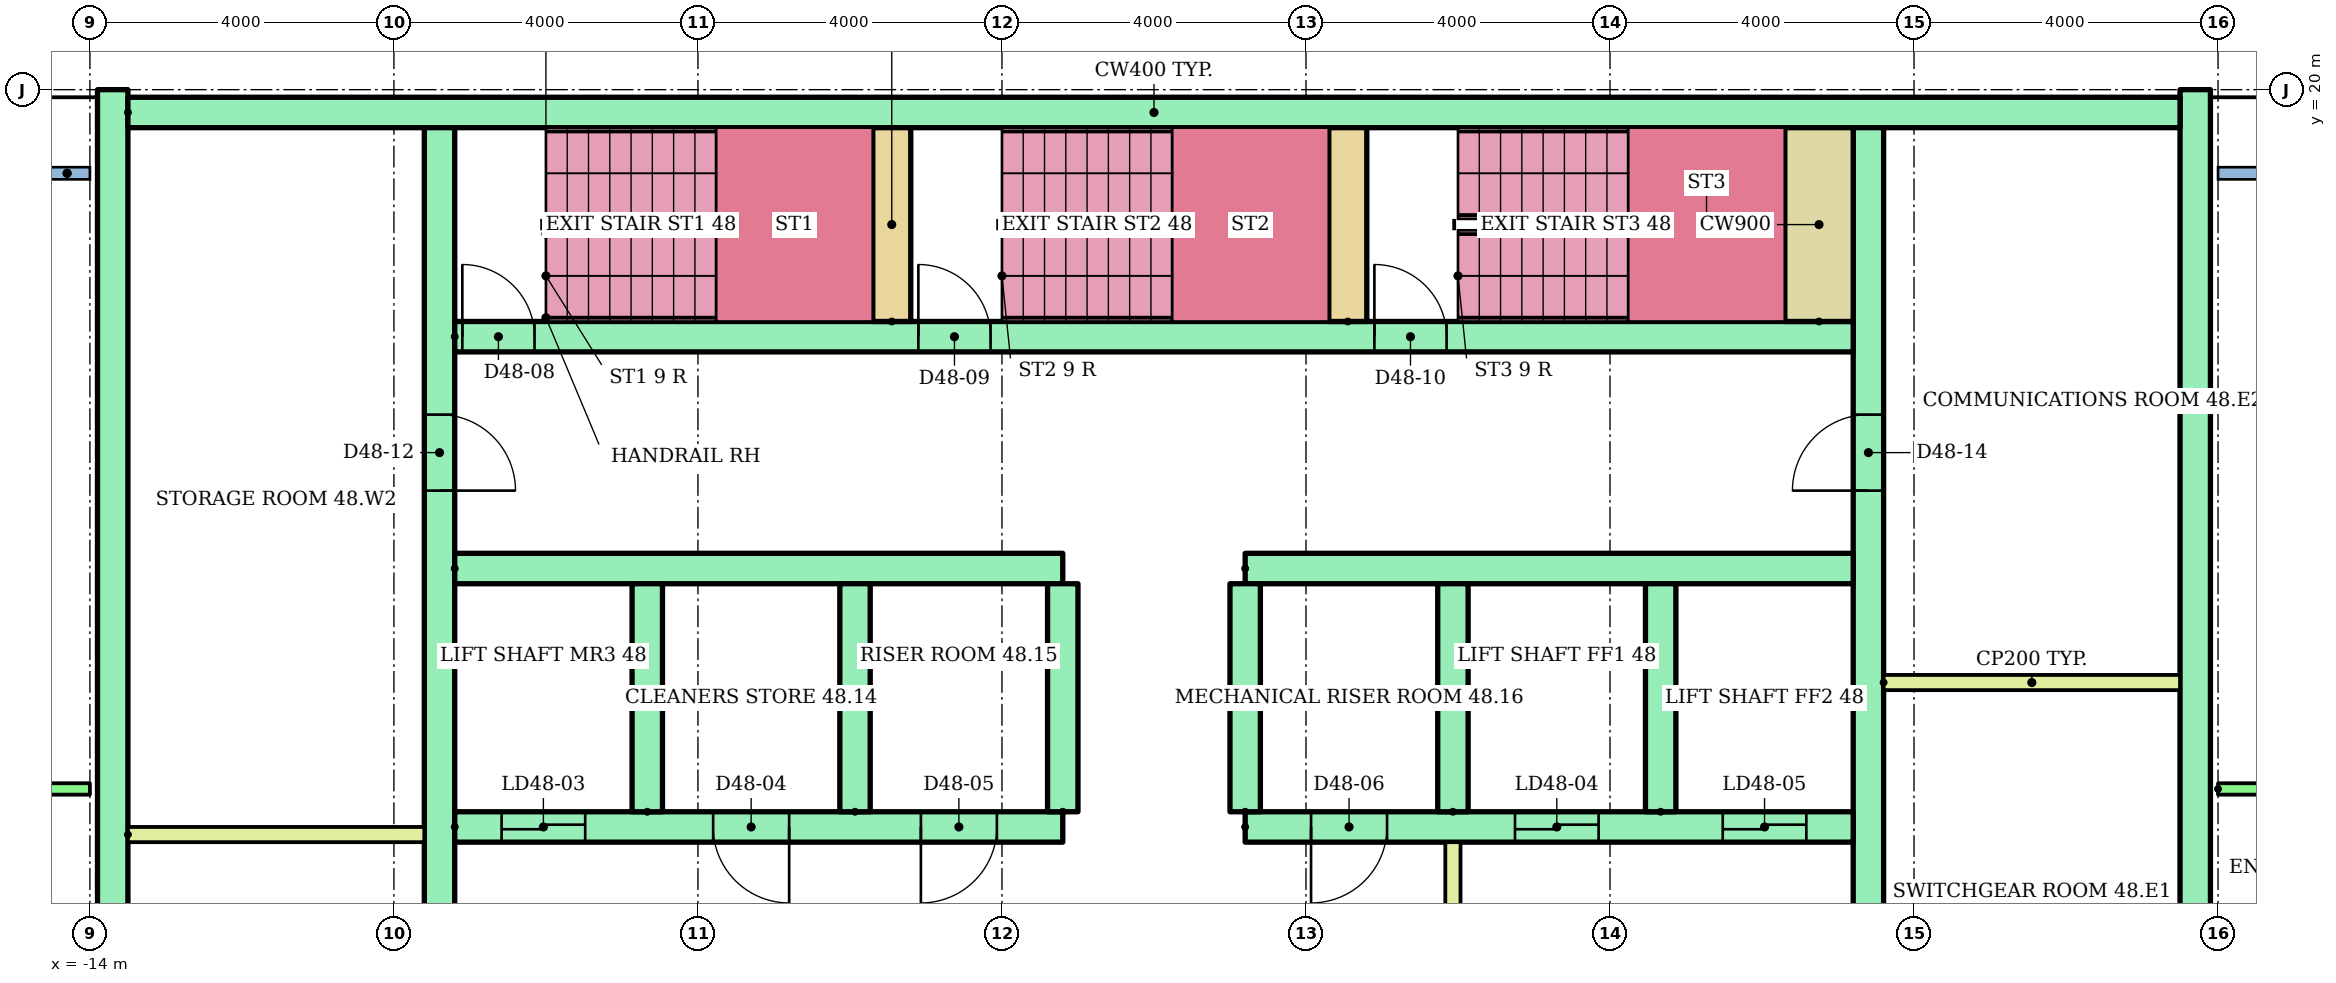
"""IFC4 building model, lengths in metres.
Left out: names, types, materials, properties, quantities, classifications, styles, units other than length and angle.
Written with IfcOpenShell. Run it as: python <this file> out.ifc"""

import sys

from ifc_helpers import new_model, si_unit, direction, frame, frame_2d, origin, place, context, subcontext, project, spatial, rectangle, extrude, element, fill, save


model = new_model("IFC4")
c1 = context("Model", 3, precision=1e-05, world=origin(), true_north=direction((0.0, 1.0)))
c2 = subcontext(c1, "Body", "Model", "MODEL_VIEW")
j1 = project(units=[si_unit("LENGTHUNIT", "METRE"), si_unit("PLANEANGLEUNIT", "RADIAN")], contexts=[c1])
p1 = place(None, origin())
s1 = spatial("IfcSite", under=j1, at=p1, CompositionType="ELEMENT")
p2 = place(p1, origin())
s2 = spatial("IfcBuilding", under=s1, at=p2, CompositionType="ELEMENT")
p3 = place(p2, frame((0.0, 0.0, 184.5)))
s3 = spatial("IfcBuildingStorey", under=s2, at=p3, CompositionType="ELEMENT", Elevation=184.5)
for number, where, z_axis, x_axis in (
    (1, (-13.7, 3.0, 0.0), (0.0, 0.0, 1.0), (0.0, 1.0, 0.0)),
    (2, (13.7, 3.0, 0.0), (0.0, 0.0, 1.0), (0.0, 1.0, 0.0)),
):
    element("IfcWall", number, at=place(p3, frame(where, z_axis=z_axis, x_axis=x_axis)), inside=s3, PredefinedType="SHEAR", context=c2, shape_type="SweptSolid", body=[
        extrude(rectangle(XDim=17.0, YDim=0.4, at=frame_2d((8.5, 0.0))), origin(), (0.0, 0.0, 1.0), 2.92),
    ])
p4 = place(p3, frame((-13.5, 19.7, 0.0)))
e3 = element("IfcWall", 3, at=p4, inside=s3, PredefinedType="SHEAR", context=c2, shape_type="SweptSolid", body=[
    extrude(rectangle(XDim=27.0, YDim=0.4, at=frame_2d((13.5, 0.0))), origin(), (0.0, 0.0, 1.0), 2.92),
])
p5 = place(p3, frame((-9.4, 6.8, 0.0), z_axis=(0.0, 0.0, 1.0), x_axis=(0.0, 1.0, 0.0)))
e4 = element("IfcWall", 4, at=p5, inside=s3, PredefinedType="SHEAR", context=c2, shape_type="SweptSolid", body=[
    extrude(rectangle(XDim=12.7, YDim=0.4, at=frame_2d((6.35, 0.0))), origin(), (0.0, 0.0, 1.0), 2.92),
])
p6 = place(p5, frame((1.15, 0.0, 0.0)))
e5 = element("IfcOpeningElement", 5, at=p6, cuts=e4, PredefinedType="OPENING", context=c2, shape_type="SweptSolid", body=[
    extrude(rectangle(XDim=1.0, YDim=2.1, at=frame_2d((0.5, 1.05))), frame((0.0, 0.21, 0.0), z_axis=(0.0, -1.0, 0.0), x_axis=(1.0, 0.0, 0.0)), (0.0, 0.0, 1.0), 0.42),
])
p7 = place(p5, frame((7.925, 0.0, 0.0)))
e6 = element("IfcOpeningElement", 6, at=p7, cuts=e4, PredefinedType="OPENING", context=c2, shape_type="SweptSolid", body=[
    extrude(rectangle(XDim=1.0, YDim=2.1, at=frame_2d((0.5, 1.05))), frame((0.0, 0.21, 0.0), z_axis=(0.0, -1.0, 0.0), x_axis=(1.0, 0.0, 0.0)), (0.0, 0.0, 1.0), 0.42),
])
p8 = place(p3, frame((9.4, 6.8, 0.0), z_axis=(0.0, 0.0, 1.0), x_axis=(0.0, 1.0, 0.0)))
e7 = element("IfcWall", 7, at=p8, inside=s3, PredefinedType="SHEAR", context=c2, shape_type="SweptSolid", body=[
    extrude(rectangle(XDim=12.7, YDim=0.4, at=frame_2d((6.35, 0.0))), origin(), (0.0, 0.0, 1.0), 2.92),
])
p9 = place(p8, frame((1.15, 0.0, 0.0)))
e8 = element("IfcOpeningElement", 8, at=p9, cuts=e7, PredefinedType="OPENING", context=c2, shape_type="SweptSolid", body=[
    extrude(rectangle(XDim=1.0, YDim=2.1, at=frame_2d((0.5, 1.05))), frame((0.0, 0.21, 0.0), z_axis=(0.0, -1.0, 0.0), x_axis=(1.0, 0.0, 0.0)), (0.0, 0.0, 1.0), 0.42),
])
p10 = place(p8, frame((7.925, 0.0, 0.0)))
e9 = element("IfcOpeningElement", 9, at=p10, cuts=e7, PredefinedType="OPENING", context=c2, shape_type="SweptSolid", body=[
    extrude(rectangle(XDim=1.0, YDim=2.1, at=frame_2d((0.5, 1.05))), frame((0.0, 0.21, 0.0), z_axis=(0.0, -1.0, 0.0), x_axis=(1.0, 0.0, 0.0)), (0.0, 0.0, 1.0), 0.42),
])
p11 = place(p3, frame((-9.2, 10.3, 0.0)))
e10 = element("IfcWall", 10, at=p11, inside=s3, PredefinedType="SHEAR", context=c2, shape_type="SweptSolid", body=[
    extrude(rectangle(XDim=8.0, YDim=0.4, at=frame_2d((4.0, 0.0))), origin(), (0.0, 0.0, 1.0), 2.92),
])
p12 = place(p11, frame((0.617, 0.0, 0.0)))
e11 = element("IfcOpeningElement", 11, at=p12, cuts=e10, PredefinedType="OPENING", context=c2, shape_type="SweptSolid", body=[
    extrude(rectangle(XDim=1.1, YDim=2.1, at=frame_2d((0.55, 1.05))), frame((0.0, 0.21, 0.0), z_axis=(0.0, -1.0, 0.0), x_axis=(1.0, 0.0, 0.0)), (0.0, 0.0, 1.0), 0.42),
])
p13 = place(p11, frame((3.4, 0.0, 0.0)))
e12 = element("IfcOpeningElement", 12, at=p13, cuts=e10, PredefinedType="OPENING", context=c2, shape_type="SweptSolid", body=[
    extrude(rectangle(XDim=1.0, YDim=2.1, at=frame_2d((0.5, 1.05))), frame((0.0, 0.21, 0.0), z_axis=(0.0, -1.0, 0.0), x_axis=(1.0, 0.0, 0.0)), (0.0, 0.0, 1.0), 0.42),
])
p14 = place(p11, frame((6.133, 0.0, 0.0)))
e13 = element("IfcOpeningElement", 13, at=p14, cuts=e10, PredefinedType="OPENING", context=c2, shape_type="SweptSolid", body=[
    extrude(rectangle(XDim=1.0, YDim=2.1, at=frame_2d((0.5, 1.05))), frame((0.0, 0.21, 0.0), z_axis=(0.0, -1.0, 0.0), x_axis=(1.0, 0.0, 0.0)), (0.0, 0.0, 1.0), 0.42),
])
p15 = place(p3, frame((-9.2, 13.7, 0.0)))
e14 = element("IfcWall", 14, at=p15, inside=s3, PredefinedType="SHEAR", context=c2, shape_type="SweptSolid", body=[
    extrude(rectangle(XDim=8.0, YDim=0.4, at=frame_2d((4.0, 0.0))), origin(), (0.0, 0.0, 1.0), 2.92),
])
p16 = place(p3, frame((1.2, 10.3, 0.0)))
e15 = element("IfcWall", 15, at=p16, inside=s3, PredefinedType="SHEAR", context=c2, shape_type="SweptSolid", body=[
    extrude(rectangle(XDim=8.0, YDim=0.4, at=frame_2d((4.0, 0.0))), origin(), (0.0, 0.0, 1.0), 2.92),
])
p17 = place(p16, frame((3.55, 0.0, 0.0)))
e16 = element("IfcOpeningElement", 16, at=p17, cuts=e15, PredefinedType="OPENING", context=c2, shape_type="SweptSolid", body=[
    extrude(rectangle(XDim=1.1, YDim=2.1, at=frame_2d((0.55, 1.05))), frame((0.0, 0.21, 0.0), z_axis=(0.0, -1.0, 0.0), x_axis=(1.0, 0.0, 0.0)), (0.0, 0.0, 1.0), 0.42),
])
p18 = place(p16, frame((6.283, 0.0, 0.0)))
e17 = element("IfcOpeningElement", 17, at=p18, cuts=e15, PredefinedType="OPENING", context=c2, shape_type="SweptSolid", body=[
    extrude(rectangle(XDim=1.1, YDim=2.1, at=frame_2d((0.55, 1.05))), frame((0.0, 0.21, 0.0), z_axis=(0.0, -1.0, 0.0), x_axis=(1.0, 0.0, 0.0)), (0.0, 0.0, 1.0), 0.42),
])
p19 = place(p16, frame((0.867, 0.0, 0.0)))
e18 = element("IfcOpeningElement", 18, at=p19, cuts=e15, PredefinedType="OPENING", context=c2, shape_type="SweptSolid", body=[
    extrude(rectangle(XDim=1.0, YDim=2.1, at=frame_2d((0.5, 1.05))), frame((0.0, 0.21, 0.0), z_axis=(0.0, -1.0, 0.0), x_axis=(1.0, 0.0, 0.0)), (0.0, 0.0, 1.0), 0.42),
])
p20 = place(p3, frame((1.2, 13.7, 0.0)))
e19 = element("IfcWall", 19, at=p20, inside=s3, PredefinedType="SHEAR", context=c2, shape_type="SweptSolid", body=[
    extrude(rectangle(XDim=8.0, YDim=0.4, at=frame_2d((4.0, 0.0))), origin(), (0.0, 0.0, 1.0), 2.92),
])
for number, where, z_axis, x_axis in (
    (20, (-6.667, 10.5, 0.0), (0.0, 0.0, 1.0), (0.0, 1.0, 0.0)),
    (21, (-3.933, 10.5, 0.0), (0.0, 0.0, 1.0), (0.0, 1.0, 0.0)),
    (22, (-1.2, 10.5, 0.0), (0.0, 0.0, 1.0), (0.0, 1.0, 0.0)),
    (23, (1.2, 10.5, 0.0), (0.0, 0.0, 1.0), (0.0, 1.0, 0.0)),
    (24, (3.933, 10.5, 0.0), (0.0, 0.0, 1.0), (0.0, 1.0, 0.0)),
    (25, (6.667, 10.5, 0.0), (0.0, 0.0, 1.0), (0.0, 1.0, 0.0)),
):
    element("IfcWall", number, at=place(p3, frame(where, z_axis=z_axis, x_axis=x_axis)), inside=s3, PredefinedType="SHEAR", context=c2, shape_type="SweptSolid", body=[
        extrude(rectangle(XDim=3.0, YDim=0.4, at=frame_2d((1.5, 0.0))), origin(), (0.0, 0.0, 1.0), 2.92),
    ])
p21 = place(p3, frame((3.933, 6.8, 0.0), z_axis=(0.0, 0.0, 1.0), x_axis=(0.0, 1.0, 0.0)))
e26 = element("IfcWall", 26, at=p21, inside=s3, PredefinedType="PARTITIONING", context=c2, shape_type="SweptSolid", body=[
    extrude(rectangle(XDim=3.3, YDim=0.2, at=frame_2d((1.65, 0.0))), origin(), (0.0, 0.0, 1.0), 2.92),
])
p22 = place(p21, frame((1.1, 0.0, 0.0)))
e27 = element("IfcOpeningElement", 27, at=p22, cuts=e26, PredefinedType="OPENING", context=c2, shape_type="SweptSolid", body=[
    extrude(rectangle(XDim=1.1, YDim=2.1, at=frame_2d((0.55, 1.05))), frame((0.0, 0.11, 0.0), z_axis=(0.0, -1.0, 0.0), x_axis=(1.0, 0.0, 0.0)), (0.0, 0.0, 1.0), 0.22),
])
p23 = place(p3, frame((-9.2, 16.75, 0.0)))
e28 = element("IfcWall", 28, at=p23, inside=s3, PredefinedType="SHEAR", context=c2, shape_type="SweptSolid", body=[
    extrude(rectangle(XDim=18.4, YDim=0.4, at=frame_2d((9.2, 0.0))), origin(), (0.0, 0.0, 1.0), 2.92),
])
p24 = place(p23, frame((0.1, 0.0, 0.0)))
e29 = element("IfcOpeningElement", 29, at=p24, cuts=e28, PredefinedType="OPENING", context=c2, shape_type="SweptSolid", body=[
    extrude(rectangle(XDim=0.95, YDim=2.1, at=frame_2d((0.475, 1.05))), frame((0.0, 0.21, 0.0), z_axis=(0.0, -1.0, 0.0), x_axis=(1.0, 0.0, 0.0)), (0.0, 0.0, 1.0), 0.42),
])
p25 = place(p23, frame((6.1, 0.0, 0.0)))
e30 = element("IfcOpeningElement", 30, at=p25, cuts=e28, PredefinedType="OPENING", context=c2, shape_type="SweptSolid", body=[
    extrude(rectangle(XDim=0.95, YDim=2.1, at=frame_2d((0.475, 1.05))), frame((0.0, 0.21, 0.0), z_axis=(0.0, -1.0, 0.0), x_axis=(1.0, 0.0, 0.0)), (0.0, 0.0, 1.0), 0.42),
])
p26 = place(p23, frame((12.1, 0.0, 0.0)))
e31 = element("IfcOpeningElement", 31, at=p26, cuts=e28, PredefinedType="OPENING", context=c2, shape_type="SweptSolid", body=[
    extrude(rectangle(XDim=0.95, YDim=2.1, at=frame_2d((0.475, 1.05))), frame((0.0, 0.21, 0.0), z_axis=(0.0, -1.0, 0.0), x_axis=(1.0, 0.0, 0.0)), (0.0, 0.0, 1.0), 0.42),
])
for number, where, z_axis, x_axis in (
    (32, (-3.45, 16.95, 0.0), (0.0, 0.0, 1.0), (0.0, 1.0, 0.0)),
    (33, (2.55, 16.95, 0.0), (0.0, 0.0, 1.0), (0.0, 1.0, 0.0)),
):
    element("IfcWall", number, at=place(p3, frame(where, z_axis=z_axis, x_axis=x_axis)), inside=s3, PredefinedType="SHEAR", context=c2, shape_type="SweptSolid", body=[
        extrude(rectangle(XDim=2.55, YDim=0.5, at=frame_2d((1.275, 0.0))), origin(), (0.0, 0.0, 1.0), 2.92),
    ])
p27 = place(p3, frame((8.75, 16.95, 0.0), z_axis=(0.0, 0.0, 1.0), x_axis=(0.0, 1.0, 0.0)))
e34 = element("IfcWall", 34, at=p27, inside=s3, PredefinedType="SHEAR", context=c2, shape_type="SweptSolid", body=[
    extrude(rectangle(XDim=2.55, YDim=0.9, at=frame_2d((1.275, 0.0))), origin(), (0.0, 0.0, 1.0), 2.92),
])
for number, where in (
    (35, (-13.5, 10.2, 0.0)),
    (36, (9.6, 12.2, 0.0)),
):
    element("IfcWall", number, at=place(p3, frame(where)), inside=s3, PredefinedType="PARTITIONING", context=c2, shape_type="SweptSolid", body=[
        extrude(rectangle(XDim=3.9, YDim=0.2, at=frame_2d((1.95, 0.0))), origin(), (0.0, 0.0, 1.0), 2.92),
    ])
p28 = place(p3, frame((-24.82, 10.8, 0.0)))
e37 = element("IfcWall", 37, at=p28, inside=s3, PredefinedType="PARTITIONING", context=c2, shape_type="SweptSolid", body=[
    extrude(rectangle(XDim=10.82, YDim=0.15, at=frame_2d((5.41, 0.0))), origin(), (0.0, 0.0, 1.0), 2.4),
])
p29 = place(p28, frame((1.273, 0.0, 0.0)))
e38 = element("IfcOpeningElement", 38, at=p29, cuts=e37, PredefinedType="OPENING", context=c2, shape_type="SweptSolid", body=[
    extrude(rectangle(XDim=1.0, YDim=2.1, at=frame_2d((0.5, 1.05))), frame((0.0, 0.085, 0.0), z_axis=(0.0, -1.0, 0.0), x_axis=(1.0, 0.0, 0.0)), (0.0, 0.0, 1.0), 0.17),
])
p30 = place(p28, frame((7.32, 0.0, 0.0)))
e39 = element("IfcOpeningElement", 39, at=p30, cuts=e37, PredefinedType="OPENING", context=c2, shape_type="SweptSolid", body=[
    extrude(rectangle(XDim=0.9, YDim=2.1, at=frame_2d((0.45, 1.05))), frame((0.0, 0.085, 0.0), z_axis=(0.0, -1.0, 0.0), x_axis=(1.0, 0.0, 0.0)), (0.0, 0.0, 1.0), 0.17),
])
p31 = place(p3, frame((14.0, 10.8, 0.0)))
e40 = element("IfcWall", 40, at=p31, inside=s3, PredefinedType="PARTITIONING", context=c2, shape_type="SweptSolid", body=[
    extrude(rectangle(XDim=12.0, YDim=0.15, at=frame_2d((6.0, 0.0))), origin(), (0.0, 0.0, 1.0), 2.4),
])
p32 = place(p31, frame((1.5, 0.0, 0.0)))
e41 = element("IfcOpeningElement", 41, at=p32, cuts=e40, PredefinedType="OPENING", context=c2, shape_type="SweptSolid", body=[
    extrude(rectangle(XDim=1.0, YDim=2.1, at=frame_2d((0.5, 1.05))), frame((0.0, 0.085, 0.0), z_axis=(0.0, -1.0, 0.0), x_axis=(1.0, 0.0, 0.0)), (0.0, 0.0, 1.0), 0.17),
])
p33 = place(p31, frame((7.55, 0.0, 0.0)))
e42 = element("IfcOpeningElement", 42, at=p33, cuts=e40, PredefinedType="OPENING", context=c2, shape_type="SweptSolid", body=[
    extrude(rectangle(XDim=0.9, YDim=2.1, at=frame_2d((0.45, 1.05))), frame((0.0, 0.085, 0.0), z_axis=(0.0, -1.0, 0.0), x_axis=(1.0, 0.0, 0.0)), (0.0, 0.0, 1.0), 0.17),
])
p34 = place(p12, origin())
e43 = element("IfcDoor", 43, at=p34, inside=s3, OperationType="SLIDING_TO_LEFT", PredefinedType="DOOR", context=c2, shape_type="SweptSolid", body=[
    extrude(rectangle(XDim=1.1, YDim=2.1, at=frame_2d((0.55, 1.05))), frame((0.0, 0.025, 0.0), z_axis=(0.0, -1.0, 0.0), x_axis=(1.0, 0.0, 0.0)), (0.0, 0.0, 1.0), 0.05),
])
fill(e11, e43)
p35 = place(p17, origin())
e44 = element("IfcDoor", 44, at=p35, inside=s3, OperationType="SLIDING_TO_LEFT", PredefinedType="DOOR", context=c2, shape_type="SweptSolid", body=[
    extrude(rectangle(XDim=1.1, YDim=2.1, at=frame_2d((0.55, 1.05))), frame((0.0, 0.025, 0.0), z_axis=(0.0, -1.0, 0.0), x_axis=(1.0, 0.0, 0.0)), (0.0, 0.0, 1.0), 0.05),
])
fill(e16, e44)
p36 = place(p18, origin())
e45 = element("IfcDoor", 45, at=p36, inside=s3, OperationType="SLIDING_TO_LEFT", PredefinedType="DOOR", context=c2, shape_type="SweptSolid", body=[
    extrude(rectangle(XDim=1.1, YDim=2.1, at=frame_2d((0.55, 1.05))), frame((0.0, 0.025, 0.0), z_axis=(0.0, -1.0, 0.0), x_axis=(1.0, 0.0, 0.0)), (0.0, 0.0, 1.0), 0.05),
])
fill(e17, e45)
p37 = place(p13, frame((1.0, 0.0, 0.0), z_axis=(0.0, 0.0, 1.0), x_axis=(-1.0, 0.0, 0.0)))
e46 = element("IfcDoor", 46, at=p37, inside=s3, OperationType="SINGLE_SWING_RIGHT", PredefinedType="DOOR", context=c2, shape_type="SweptSolid", body=[
    extrude(rectangle(XDim=1.0, YDim=2.1, at=frame_2d((0.5, 1.05))), frame((0.0, 0.025, 0.0), z_axis=(0.0, -1.0, 0.0), x_axis=(1.0, 0.0, 0.0)), (0.0, 0.0, 1.0), 0.05),
])
fill(e12, e46)
p38 = place(p14, frame((1.0, 0.0, 0.0), z_axis=(0.0, 0.0, 1.0), x_axis=(-1.0, 0.0, 0.0)))
e47 = element("IfcDoor", 47, at=p38, inside=s3, OperationType="SINGLE_SWING_LEFT", PredefinedType="DOOR", context=c2, shape_type="SweptSolid", body=[
    extrude(rectangle(XDim=1.0, YDim=2.1, at=frame_2d((0.5, 1.05))), frame((0.0, 0.025, 0.0), z_axis=(0.0, -1.0, 0.0), x_axis=(1.0, 0.0, 0.0)), (0.0, 0.0, 1.0), 0.05),
])
fill(e13, e47)
p39 = place(p19, frame((1.0, 0.0, 0.0), z_axis=(0.0, 0.0, 1.0), x_axis=(-1.0, 0.0, 0.0)))
e48 = element("IfcDoor", 48, at=p39, inside=s3, OperationType="SINGLE_SWING_LEFT", PredefinedType="DOOR", context=c2, shape_type="SweptSolid", body=[
    extrude(rectangle(XDim=1.0, YDim=2.1, at=frame_2d((0.5, 1.05))), frame((0.0, 0.025, 0.0), z_axis=(0.0, -1.0, 0.0), x_axis=(1.0, 0.0, 0.0)), (0.0, 0.0, 1.0), 0.05),
])
fill(e18, e48)
p40 = place(p24, origin())
e49 = element("IfcDoor", 49, at=p40, inside=s3, OperationType="SINGLE_SWING_LEFT", PredefinedType="DOOR", context=c2, shape_type="SweptSolid", body=[
    extrude(rectangle(XDim=0.95, YDim=2.1, at=frame_2d((0.475, 1.05))), frame((0.0, 0.025, 0.0), z_axis=(0.0, -1.0, 0.0), x_axis=(1.0, 0.0, 0.0)), (0.0, 0.0, 1.0), 0.05),
])
fill(e29, e49)
p41 = place(p25, origin())
e50 = element("IfcDoor", 50, at=p41, inside=s3, OperationType="SINGLE_SWING_LEFT", PredefinedType="DOOR", context=c2, shape_type="SweptSolid", body=[
    extrude(rectangle(XDim=0.95, YDim=2.1, at=frame_2d((0.475, 1.05))), frame((0.0, 0.025, 0.0), z_axis=(0.0, -1.0, 0.0), x_axis=(1.0, 0.0, 0.0)), (0.0, 0.0, 1.0), 0.05),
])
fill(e30, e50)
p42 = place(p26, origin())
e51 = element("IfcDoor", 51, at=p42, inside=s3, OperationType="SINGLE_SWING_LEFT", PredefinedType="DOOR", context=c2, shape_type="SweptSolid", body=[
    extrude(rectangle(XDim=0.95, YDim=2.1, at=frame_2d((0.475, 1.05))), frame((0.0, 0.025, 0.0), z_axis=(0.0, -1.0, 0.0), x_axis=(1.0, 0.0, 0.0)), (0.0, 0.0, 1.0), 0.05),
])
fill(e31, e51)
p43 = place(p7, frame((1.0, 0.0, 0.0), z_axis=(0.0, 0.0, 1.0), x_axis=(-1.0, 0.0, 0.0)))
e52 = element("IfcDoor", 52, at=p43, inside=s3, OperationType="SINGLE_SWING_LEFT", PredefinedType="DOOR", context=c2, shape_type="SweptSolid", body=[
    extrude(rectangle(XDim=1.0, YDim=2.1, at=frame_2d((0.5, 1.05))), frame((0.0, 0.025, 0.0), z_axis=(0.0, -1.0, 0.0), x_axis=(1.0, 0.0, 0.0)), (0.0, 0.0, 1.0), 0.05),
])
fill(e6, e52)
p44 = place(p10, origin())
e53 = element("IfcDoor", 53, at=p44, inside=s3, OperationType="SINGLE_SWING_LEFT", PredefinedType="DOOR", context=c2, shape_type="SweptSolid", body=[
    extrude(rectangle(XDim=1.0, YDim=2.1, at=frame_2d((0.5, 1.05))), frame((0.0, 0.025, 0.0), z_axis=(0.0, -1.0, 0.0), x_axis=(1.0, 0.0, 0.0)), (0.0, 0.0, 1.0), 0.05),
])
fill(e9, e53)
save(model, sys.argv[1])
